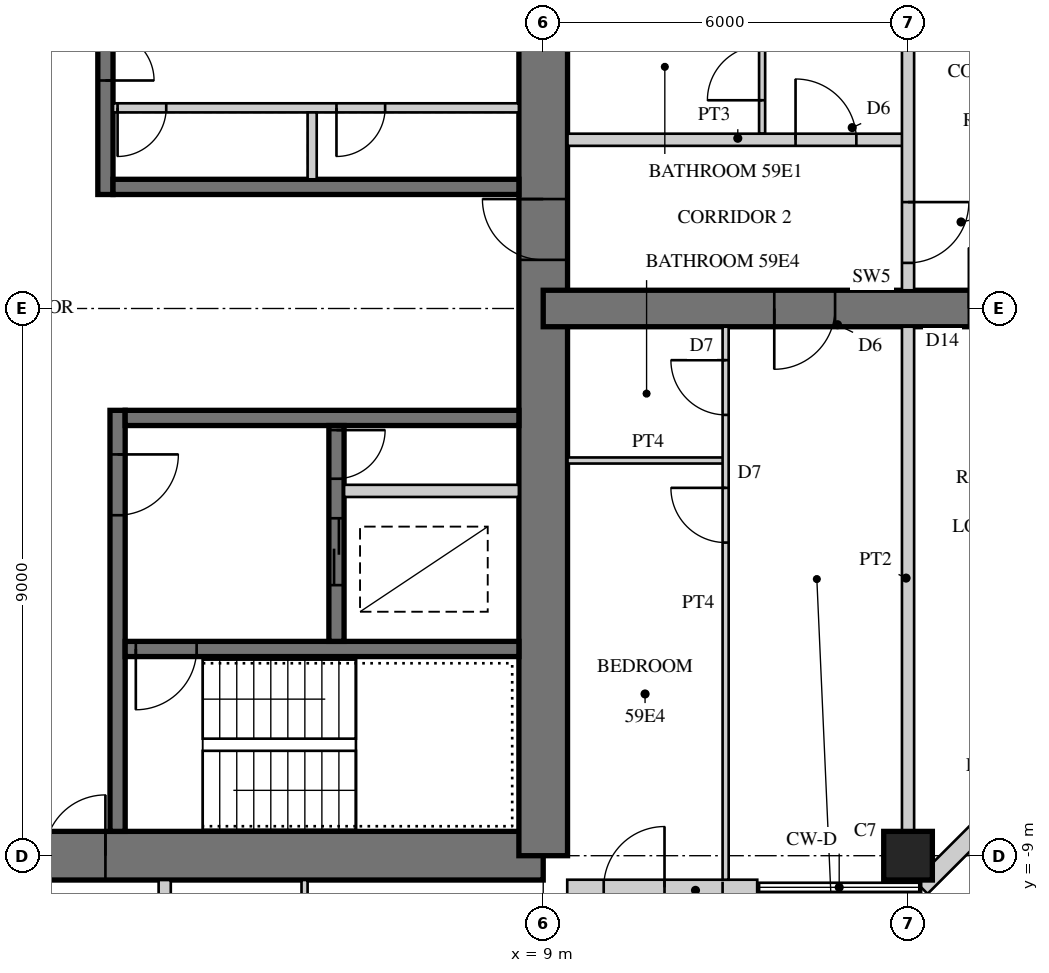
"""IFC4 building model, lengths in metres.
Left out: names, types, materials, properties, quantities, classifications, styles, units other than length and angle.
Written with IfcOpenShell. Run it as: python <this file> out.ifc"""

import sys

from ifc_helpers import new_model, si_unit, direction, frame, frame_2d, origin, origin_2d, place, context, subcontext, project, spatial, rectangle, hollow_rectangle, extrude, element, fill, save


model = new_model("IFC4")
c1 = context("Model", 3, precision=1e-05, world=origin(), true_north=direction((0.0, 1.0)))
c2 = subcontext(c1, "Body", "Model", "MODEL_VIEW")
j1 = project(units=[si_unit("LENGTHUNIT", "METRE"), si_unit("PLANEANGLEUNIT", "RADIAN")], contexts=[c1])
p1 = place(None, origin())
s1 = spatial("IfcSite", under=j1, at=p1, CompositionType="ELEMENT")
p2 = place(p1, origin())
s2 = spatial("IfcBuilding", under=s1, at=p2, CompositionType="ELEMENT")
p3 = place(p2, frame((0.0, 0.0, 232.3)))
s3 = spatial("IfcBuildingStorey", under=s2, at=p3, CompositionType="ELEMENT", Elevation=232.3)
p4 = place(p3, frame((-9.0, -9.0, 0.0), z_axis=(0.0, 0.0, 1.0), x_axis=(1.0, 0.0, 0.0)))
e1 = element("IfcWall", 1, at=p4, inside=s3, PredefinedType="SHEAR", context=c2, shape_type="SweptSolid", body=[
    extrude(rectangle(XDim=18.0, YDim=0.8, at=frame_2d((9.0, 0.0))), origin(), (0.0, 0.0, 1.0), 3.4),
])
p5 = place(p4, frame((9.8, 0.0, 0.0)))
e2 = element("IfcOpeningElement", 2, at=p5, cuts=e1, PredefinedType="OPENING", context=c2, shape_type="SweptSolid", body=[
    extrude(rectangle(XDim=1.0, YDim=2.4, at=frame_2d((0.5, 1.2))), frame((0.0, 0.41, 0.0), z_axis=(0.0, -1.0, 0.0), x_axis=(1.0, 0.0, 0.0)), (0.0, 0.0, 1.0), 0.82),
])
p6 = place(p3, frame((9.0, -9.0, 0.0), z_axis=(0.0, 0.0, 1.0), x_axis=(0.0, 1.0, 0.0)))
e3 = element("IfcWall", 3, at=p6, inside=s3, PredefinedType="SHEAR", context=c2, shape_type="SweptSolid", body=[
    extrude(rectangle(XDim=18.0, YDim=0.8, at=frame_2d((9.0, 0.0))), origin(), (0.0, 0.0, 1.0), 3.4),
])
p7 = place(p6, frame((9.8, 0.0, 0.0)))
e4 = element("IfcOpeningElement", 4, at=p7, cuts=e3, PredefinedType="OPENING", context=c2, shape_type="SweptSolid", body=[
    extrude(rectangle(XDim=1.0, YDim=2.4, at=frame_2d((0.5, 1.2))), frame((0.0, 0.41, 0.0), z_axis=(0.0, -1.0, 0.0), x_axis=(1.0, 0.0, 0.0)), (0.0, 0.0, 1.0), 0.82),
])
p8 = place(p3, frame((1.8, 1.875, 0.0), z_axis=(0.0, 0.0, 1.0), x_axis=(0.0, 1.0, 0.0)))
e5 = element("IfcWall", 5, at=p8, inside=s3, PredefinedType="SHEAR", context=c2, shape_type="SweptSolid", body=[
    extrude(rectangle(XDim=6.725, YDim=0.25, at=frame_2d((3.363, 0.0))), origin(), (0.0, 0.0, 1.0), 3.4),
])
p9 = place(p8, frame((1.875, 0.0, 0.0)))
e6 = element("IfcOpeningElement", 6, at=p9, cuts=e5, PredefinedType="OPENING", context=c2, shape_type="SweptSolid", body=[
    extrude(rectangle(XDim=1.6, YDim=2.4, at=frame_2d((0.8, 1.2))), frame((0.0, 0.135, 0.0), z_axis=(0.0, -1.0, 0.0), x_axis=(1.0, 0.0, 0.0)), (0.0, 0.0, 1.0), 0.27),
])
p10 = place(p3, frame((1.925, 2.0, 0.0), z_axis=(0.0, 0.0, 1.0), x_axis=(1.0, 0.0, 0.0)))
e7 = element("IfcWall", 7, at=p10, inside=s3, PredefinedType="SHEAR", context=c2, shape_type="SweptSolid", body=[
    extrude(rectangle(XDim=6.675, YDim=0.25, at=frame_2d((3.337, 0.0))), origin(), (0.0, 0.0, 1.0), 3.4),
])
p11 = place(p3, frame((1.925, 3.3, 0.0), z_axis=(0.0, 0.0, 1.0), x_axis=(1.0, 0.0, 0.0)))
e8 = element("IfcWall", 8, at=p11, inside=s3, PredefinedType="PARTITIONING", context=c2, shape_type="SweptSolid", body=[
    extrude(rectangle(XDim=6.675, YDim=0.15, at=frame_2d((3.337, 0.0))), origin(), (0.0, 0.0, 1.0), 3.4),
])
p12 = place(p11, frame((0.075, 0.0, 0.0)))
e9 = element("IfcOpeningElement", 9, at=p12, cuts=e8, PredefinedType="OPENING", context=c2, shape_type="SweptSolid", body=[
    extrude(rectangle(XDim=0.8, YDim=2.1, at=frame_2d((0.4, 1.05))), frame((0.0, 0.085, 0.0), z_axis=(0.0, -1.0, 0.0), x_axis=(1.0, 0.0, 0.0)), (0.0, 0.0, 1.0), 0.17),
])
p13 = place(p11, frame((3.675, 0.0, 0.0)))
e10 = element("IfcOpeningElement", 10, at=p13, cuts=e8, PredefinedType="OPENING", context=c2, shape_type="SweptSolid", body=[
    extrude(rectangle(XDim=0.8, YDim=2.1, at=frame_2d((0.4, 1.05))), frame((0.0, 0.085, 0.0), z_axis=(0.0, -1.0, 0.0), x_axis=(1.0, 0.0, 0.0)), (0.0, 0.0, 1.0), 0.17),
])
p14 = place(p3, frame((5.2, 2.125, 0.0), z_axis=(0.0, 0.0, 1.0), x_axis=(0.0, 1.0, 0.0)))
e11 = element("IfcWall", 11, at=p14, inside=s3, PredefinedType="PARTITIONING", context=c2, shape_type="SweptSolid", body=[
    extrude(rectangle(XDim=1.1, YDim=0.15, at=frame_2d((0.55, 0.0))), origin(), (0.0, 0.0, 1.0), 3.4),
])
p15 = place(p3, frame((2.0, -1.675, 0.0), z_axis=(0.0, 0.0, 1.0), x_axis=(0.0, -1.0, 0.0)))
e12 = element("IfcWall", 12, at=p15, inside=s3, PredefinedType="SHEAR", context=c2, shape_type="SweptSolid", body=[
    extrude(rectangle(XDim=6.925, YDim=0.25, at=frame_2d((3.462, 0.0))), origin(), (0.0, 0.0, 1.0), 3.4),
])
p16 = place(p15, frame((0.725, 0.0, 0.0)))
e13 = element("IfcOpeningElement", 13, at=p16, cuts=e12, PredefinedType="OPENING", context=c2, shape_type="SweptSolid", body=[
    extrude(rectangle(XDim=1.0, YDim=2.1, at=frame_2d((0.5, 1.05))), frame((0.0, 0.135, 0.0), z_axis=(0.0, -1.0, 0.0), x_axis=(1.0, 0.0, 0.0)), (0.0, 0.0, 1.0), 0.27),
])
p17 = place(p3, frame((2.125, -1.8, 0.0), z_axis=(0.0, 0.0, 1.0), x_axis=(1.0, 0.0, 0.0)))
e14 = element("IfcWall", 14, at=p17, inside=s3, PredefinedType="SHEAR", context=c2, shape_type="SweptSolid", body=[
    extrude(rectangle(XDim=6.475, YDim=0.25, at=frame_2d((3.238, 0.0))), origin(), (0.0, 0.0, 1.0), 3.4),
])
p18 = place(p3, frame((2.125, -5.6, 0.0), z_axis=(0.0, 0.0, 1.0), x_axis=(1.0, 0.0, 0.0)))
e15 = element("IfcWall", 15, at=p18, inside=s3, PredefinedType="SHEAR", context=c2, shape_type="SweptSolid", body=[
    extrude(rectangle(XDim=6.475, YDim=0.25, at=frame_2d((3.238, 0.0))), origin(), (0.0, 0.0, 1.0), 3.4),
])
p19 = place(p18, frame((0.175, 0.0, 0.0)))
e16 = element("IfcOpeningElement", 16, at=p19, cuts=e15, PredefinedType="OPENING", context=c2, shape_type="SweptSolid", body=[
    extrude(rectangle(XDim=1.0, YDim=2.1, at=frame_2d((0.5, 1.05))), frame((0.0, 0.135, 0.0), z_axis=(0.0, -1.0, 0.0), x_axis=(1.0, 0.0, 0.0)), (0.0, 0.0, 1.0), 0.27),
])
p20 = place(p3, frame((5.6, -1.925, 0.0), z_axis=(0.0, 0.0, 1.0), x_axis=(0.0, -1.0, 0.0)))
e17 = element("IfcWall", 17, at=p20, inside=s3, PredefinedType="SHEAR", context=c2, shape_type="SweptSolid", body=[
    extrude(rectangle(XDim=3.55, YDim=0.25, at=frame_2d((1.775, 0.0))), origin(), (0.0, 0.0, 1.0), 3.4),
])
p21 = place(p20, frame((1.525, 0.0, 0.0)))
e18 = element("IfcOpeningElement", 18, at=p21, cuts=e17, PredefinedType="OPENING", context=c2, shape_type="SweptSolid", body=[
    extrude(rectangle(XDim=1.1, YDim=2.2, at=frame_2d((0.55, 1.1))), frame((0.0, 0.135, 0.0), z_axis=(0.0, -1.0, 0.0), x_axis=(1.0, 0.0, 0.0)), (0.0, 0.0, 1.0), 0.27),
])
p22 = place(p20, frame((0.075, 0.0, 0.0)))
e19 = element("IfcOpeningElement", 19, at=p22, cuts=e17, PredefinedType="OPENING", context=c2, shape_type="SweptSolid", body=[
    extrude(rectangle(XDim=0.8, YDim=2.1, at=frame_2d((0.4, 1.05))), frame((0.0, 0.135, 0.0), z_axis=(0.0, -1.0, 0.0), x_axis=(1.0, 0.0, 0.0)), (0.0, 0.0, 1.0), 0.27),
])
p23 = place(p3, frame((5.725, -3.0, 0.0), z_axis=(0.0, 0.0, 1.0), x_axis=(1.0, 0.0, 0.0)))
e20 = element("IfcWall", 20, at=p23, inside=s3, PredefinedType="PARTITIONING", context=c2, shape_type="SweptSolid", body=[
    extrude(rectangle(XDim=2.875, YDim=0.2, at=frame_2d((1.438, 0.0))), origin(), (0.0, 0.0, 1.0), 3.4),
])
p24 = place(p3, frame((9.0, 0.0, 0.0), z_axis=(0.0, 0.0, 1.0), x_axis=(1.0, 0.0, 0.0)))
e21 = element("IfcWall", 21, at=p24, inside=s3, PredefinedType="SHEAR", context=c2, shape_type="SweptSolid", body=[
    extrude(rectangle(XDim=9.0, YDim=0.6, at=frame_2d((4.5, 0.0))), origin(), (0.0, 0.0, 1.0), 3.4),
])
p25 = place(p24, frame((3.8, 0.0, 0.0)))
e22 = element("IfcOpeningElement", 22, at=p25, cuts=e21, PredefinedType="OPENING", context=c2, shape_type="SweptSolid", body=[
    extrude(rectangle(XDim=1.0, YDim=2.15, at=frame_2d((0.5, 1.075))), frame((0.0, 0.31, 0.0), z_axis=(0.0, -1.0, 0.0), x_axis=(1.0, 0.0, 0.0)), (0.0, 0.0, 1.0), 0.62),
])
p26 = place(p24, frame((7.0, 0.0, 0.0)))
e23 = element("IfcOpeningElement", 23, at=p26, cuts=e21, PredefinedType="OPENING", context=c2, shape_type="SweptSolid", body=[
    extrude(rectangle(XDim=1.0, YDim=2.2, at=frame_2d((0.5, 1.1))), frame((0.0, 0.31, 0.0), z_axis=(0.0, -1.0, 0.0), x_axis=(1.0, 0.0, 0.0)), (0.0, 0.0, 1.0), 0.62),
])
p27 = place(p3, frame((15.0, -9.0, 0.0), z_axis=(0.0, 0.0, 1.0), x_axis=(1.0, 0.0, 0.0)))
e24 = element("IfcColumn", 24, at=p27, inside=s3, PredefinedType="COLUMN", context=c2, shape_type="SweptSolid", body=[
    extrude(rectangle(XDim=0.8, YDim=0.8, at=origin_2d()), origin(), (0.0, 0.0, 1.0), 3.4),
])
p28 = place(p3, frame((9.395, -9.52, 0.0), z_axis=(0.0, 0.0, 1.0), x_axis=(1.0, 0.0, 0.0)))
e25 = element("IfcWall", 25, at=p28, inside=s3, PredefinedType="SOLIDWALL", context=c2, shape_type="SweptSolid", body=[
    extrude(rectangle(XDim=3.125, YDim=0.25, at=frame_2d((1.562, 0.0))), origin(), (0.0, 0.0, 1.0), 3.22),
])
p29 = place(p28, frame((0.6, 0.0, 0.0)))
e26 = element("IfcOpeningElement", 26, at=p29, cuts=e25, PredefinedType="OPENING", context=c2, shape_type="SweptSolid", body=[
    extrude(rectangle(XDim=1.0, YDim=2.2, at=frame_2d((0.5, 1.1))), frame((0.0, 0.135, 0.0), z_axis=(0.0, -1.0, 0.0), x_axis=(1.0, 0.0, 0.0)), (0.0, 0.0, 1.0), 0.27),
])
p30 = place(p3, frame((15.215, -9.52, 0.0), z_axis=(0.0, 0.0, 1.0), x_axis=(0.707106781187, 0.707106781187, 0.0)))
e27 = element("IfcWall", 27, at=p30, inside=s3, PredefinedType="SOLIDWALL", context=c2, shape_type="SweptSolid", body=[
    extrude(rectangle(XDim=4.674, YDim=0.3, at=frame_2d((2.337, 0.0))), origin(), (0.0, 0.0, 1.0), 3.22),
])
p31 = place(p30, frame((1.887, 0.0, 0.3)))
e28 = element("IfcOpeningElement", 28, at=p31, cuts=e27, PredefinedType="OPENING", context=c2, shape_type="SweptSolid", body=[
    extrude(rectangle(XDim=0.9, YDim=2.4, at=frame_2d((0.45, 1.2))), frame((0.0, 0.16, 0.0), z_axis=(0.0, -1.0, 0.0), x_axis=(1.0, 0.0, 0.0)), (0.0, 0.0, 1.0), 0.32),
])
p32 = place(p3, frame((12.6, 2.875, 0.0), z_axis=(0.0, 0.0, 1.0), x_axis=(0.0, 1.0, 0.0)))
e29 = element("IfcWall", 29, at=p32, inside=s3, PredefinedType="PARTITIONING", context=c2, shape_type="SweptSolid", body=[
    extrude(rectangle(XDim=6.605, YDim=0.1, at=frame_2d((3.302, 0.0))), origin(), (0.0, 0.0, 1.0), 3.22),
])
p33 = place(p32, frame((0.55, 0.0, 0.0)))
e30 = element("IfcOpeningElement", 30, at=p33, cuts=e29, PredefinedType="OPENING", context=c2, shape_type="SweptSolid", body=[
    extrude(rectangle(XDim=0.9, YDim=2.1, at=frame_2d((0.45, 1.05))), frame((0.0, 0.06, 0.0), z_axis=(0.0, -1.0, 0.0), x_axis=(1.0, 0.0, 0.0)), (0.0, 0.0, 1.0), 0.12),
])
p34 = place(p32, frame((2.65, 0.0, 0.0)))
e31 = element("IfcOpeningElement", 31, at=p34, cuts=e29, PredefinedType="OPENING", context=c2, shape_type="SweptSolid", body=[
    extrude(rectangle(XDim=0.9, YDim=2.1, at=frame_2d((0.45, 1.05))), frame((0.0, 0.06, 0.0), z_axis=(0.0, -1.0, 0.0), x_axis=(1.0, 0.0, 0.0)), (0.0, 0.0, 1.0), 0.12),
])
p35 = place(p3, frame((9.4, -2.5, 0.0), z_axis=(0.0, 0.0, 1.0), x_axis=(1.0, 0.0, 0.0)))
e32 = element("IfcWall", 32, at=p35, inside=s3, PredefinedType="PARTITIONING", context=c2, shape_type="SweptSolid", body=[
    extrude(rectangle(XDim=2.65, YDim=0.1, at=frame_2d((1.325, 0.0))), origin(), (0.0, 0.0, 1.0), 3.22),
])
p36 = place(p3, frame((12.0, -9.395, 0.0), z_axis=(0.0, 0.0, 1.0), x_axis=(0.0, 1.0, 0.0)))
e33 = element("IfcWall", 33, at=p36, inside=s3, PredefinedType="PARTITIONING", context=c2, shape_type="SweptSolid", body=[
    extrude(rectangle(XDim=9.095, YDim=0.1, at=frame_2d((4.547, 0.0))), origin(), (0.0, 0.0, 1.0), 3.22),
])
p37 = place(p36, frame((5.545, 0.0, 0.0)))
e34 = element("IfcOpeningElement", 34, at=p37, cuts=e33, PredefinedType="OPENING", context=c2, shape_type="SweptSolid", body=[
    extrude(rectangle(XDim=0.9, YDim=2.1, at=frame_2d((0.45, 1.05))), frame((0.0, 0.06, 0.0), z_axis=(0.0, -1.0, 0.0), x_axis=(1.0, 0.0, 0.0)), (0.0, 0.0, 1.0), 0.12),
])
p38 = place(p36, frame((7.645, 0.0, 0.0)))
e35 = element("IfcOpeningElement", 35, at=p38, cuts=e33, PredefinedType="OPENING", context=c2, shape_type="SweptSolid", body=[
    extrude(rectangle(XDim=0.9, YDim=2.1, at=frame_2d((0.45, 1.05))), frame((0.0, 0.06, 0.0), z_axis=(0.0, -1.0, 0.0), x_axis=(1.0, 0.0, 0.0)), (0.0, 0.0, 1.0), 0.12),
])
p39 = place(p3, frame((9.4, 2.775, 0.0), z_axis=(0.0, 0.0, 1.0), x_axis=(1.0, 0.0, 0.0)))
e36 = element("IfcWall", 36, at=p39, inside=s3, PredefinedType="SOLIDWALL", context=c2, shape_type="SweptSolid", body=[
    extrude(rectangle(XDim=5.6, YDim=0.2, at=frame_2d((2.8, 0.0))), origin(), (0.0, 0.0, 1.0), 3.22),
])
p40 = place(p39, frame((3.75, 0.0, 0.0)))
e37 = element("IfcOpeningElement", 37, at=p40, cuts=e36, PredefinedType="OPENING", context=c2, shape_type="SweptSolid", body=[
    extrude(rectangle(XDim=1.0, YDim=2.15, at=frame_2d((0.5, 1.075))), frame((0.0, 0.11, 0.0), z_axis=(0.0, -1.0, 0.0), x_axis=(1.0, 0.0, 0.0)), (0.0, 0.0, 1.0), 0.22),
])
p41 = place(p3, frame((15.0, -8.6, 0.0), z_axis=(0.0, 0.0, 1.0), x_axis=(0.0, 1.0, 0.0)))
e38 = element("IfcWall", 38, at=p41, inside=s3, PredefinedType="SOLIDWALL", context=c2, shape_type="SweptSolid", body=[
    extrude(rectangle(XDim=8.3, YDim=0.2, at=frame_2d((4.15, 0.0))), origin(), (0.0, 0.0, 1.0), 2.52),
])
p42 = place(p3, frame((15.0, 0.3, 0.0), z_axis=(0.0, 0.0, 1.0), x_axis=(0.0, 1.0, 0.0)))
e39 = element("IfcWall", 39, at=p42, inside=s3, PredefinedType="SOLIDWALL", context=c2, shape_type="SweptSolid", body=[
    extrude(rectangle(XDim=8.3, YDim=0.2, at=frame_2d((4.15, 0.0))), origin(), (0.0, 0.0, 1.0), 2.52),
])
p43 = place(p42, frame((0.45, 0.0, 0.0)))
e40 = element("IfcOpeningElement", 40, at=p43, cuts=e39, PredefinedType="OPENING", context=c2, shape_type="SweptSolid", body=[
    extrude(rectangle(XDim=1.0, YDim=2.2, at=frame_2d((0.5, 1.1))), frame((0.0, 0.11, 0.0), z_axis=(0.0, -1.0, 0.0), x_axis=(1.0, 0.0, 0.0)), (0.0, 0.0, 1.0), 0.22),
])
p44 = place(p3, frame((5.075, -9.4, 0.0), z_axis=(0.0, 0.0, 1.0), x_axis=(0.0, -1.0, 0.0)))
e41 = element("IfcWall", 41, at=p44, inside=s3, PredefinedType="PARTITIONING", context=c2, shape_type="SweptSolid", body=[
    extrude(rectangle(XDim=3.25, YDim=0.1, at=frame_2d((1.625, 0.0))), origin(), (0.0, 0.0, 1.0), 3.22),
])
p45 = place(p3, frame((2.775, -9.4, 0.0), z_axis=(0.0, 0.0, 1.0), x_axis=(0.0, -1.0, 0.0)))
e42 = element("IfcWall", 42, at=p45, inside=s3, PredefinedType="SOLIDWALL", context=c2, shape_type="SweptSolid", body=[
    extrude(rectangle(XDim=5.6, YDim=0.2, at=frame_2d((2.8, 0.0))), origin(), (0.0, 0.0, 1.0), 3.22),
])
p46 = place(p45, frame((3.75, 0.0, 0.0)))
e43 = element("IfcOpeningElement", 43, at=p46, cuts=e42, PredefinedType="OPENING", context=c2, shape_type="SweptSolid", body=[
    extrude(rectangle(XDim=1.0, YDim=2.15, at=frame_2d((0.5, 1.075))), frame((0.0, 0.11, 0.0), z_axis=(0.0, -1.0, 0.0), x_axis=(1.0, 0.0, 0.0)), (0.0, 0.0, 1.0), 0.22),
])
p47 = place(p29, origin())
e44 = element("IfcDoor", 44, at=p47, inside=s3, OperationType="SINGLE_SWING_RIGHT", PredefinedType="DOOR", context=c2, shape_type="SweptSolid", body=[
    extrude(hollow_rectangle(XDim=1.0, YDim=2.2, WallThickness=0.06, at=frame_2d((0.5, 1.1))), frame((0.0, 0.025, 0.0), z_axis=(0.0, -1.0, 0.0), x_axis=(1.0, 0.0, 0.0)), (0.0, 0.0, 1.0), 0.05),
    extrude(rectangle(XDim=0.879, YDim=2.079, at=frame_2d((0.5, 1.1))), frame((0.0, 0.025, 0.0), z_axis=(0.0, -1.0, 0.0), x_axis=(1.0, 0.0, 0.0)), (0.0, 0.0, 1.0), 0.05),
])
fill(e26, e44)
p48 = place(p33, origin())
e45 = element("IfcDoor", 45, at=p48, inside=s3, OperationType="SINGLE_SWING_LEFT", PredefinedType="DOOR", context=c2, shape_type="SweptSolid", body=[
    extrude(rectangle(XDim=0.9, YDim=2.1, at=frame_2d((0.45, 1.05))), frame((0.0, 0.025, 0.0), z_axis=(0.0, -1.0, 0.0), x_axis=(1.0, 0.0, 0.0)), (0.0, 0.0, 1.0), 0.05),
])
fill(e30, e45)
p49 = place(p37, origin())
e46 = element("IfcDoor", 46, at=p49, inside=s3, OperationType="SINGLE_SWING_RIGHT", PredefinedType="DOOR", context=c2, shape_type="SweptSolid", body=[
    extrude(rectangle(XDim=0.9, YDim=2.1, at=frame_2d((0.45, 1.05))), frame((0.0, 0.025, 0.0), z_axis=(0.0, -1.0, 0.0), x_axis=(1.0, 0.0, 0.0)), (0.0, 0.0, 1.0), 0.05),
])
fill(e34, e46)
p50 = place(p38, origin())
e47 = element("IfcDoor", 47, at=p50, inside=s3, OperationType="SINGLE_SWING_RIGHT", PredefinedType="DOOR", context=c2, shape_type="SweptSolid", body=[
    extrude(rectangle(XDim=0.9, YDim=2.1, at=frame_2d((0.45, 1.05))), frame((0.0, 0.025, 0.0), z_axis=(0.0, -1.0, 0.0), x_axis=(1.0, 0.0, 0.0)), (0.0, 0.0, 1.0), 0.05),
])
fill(e35, e47)
p51 = place(p40, origin())
e48 = element("IfcDoor", 48, at=p51, inside=s3, OperationType="SINGLE_SWING_LEFT", PredefinedType="DOOR", context=c2, shape_type="SweptSolid", body=[
    extrude(rectangle(XDim=1.0, YDim=2.15, at=frame_2d((0.5, 1.075))), frame((0.0, 0.025, 0.0), z_axis=(0.0, -1.0, 0.0), x_axis=(1.0, 0.0, 0.0)), (0.0, 0.0, 1.0), 0.05),
])
fill(e37, e48)
p52 = place(p43, frame((1.0, 0.0, 0.0), z_axis=(0.0, 0.0, 1.0), x_axis=(-1.0, 0.0, 0.0)))
e49 = element("IfcDoor", 49, at=p52, inside=s3, OperationType="SINGLE_SWING_LEFT", PredefinedType="DOOR", context=c2, shape_type="SweptSolid", body=[
    extrude(rectangle(XDim=1.0, YDim=2.2, at=frame_2d((0.5, 1.1))), frame((0.0, 0.025, 0.0), z_axis=(0.0, -1.0, 0.0), x_axis=(1.0, 0.0, 0.0)), (0.0, 0.0, 1.0), 0.05),
])
fill(e40, e49)
p53 = place(p25, frame((1.0, 0.0, 0.0), z_axis=(0.0, 0.0, 1.0), x_axis=(-1.0, 0.0, 0.0)))
e50 = element("IfcDoor", 50, at=p53, inside=s3, OperationType="SINGLE_SWING_RIGHT", PredefinedType="DOOR", context=c2, shape_type="SweptSolid", body=[
    extrude(rectangle(XDim=1.0, YDim=2.15, at=frame_2d((0.5, 1.075))), frame((0.0, 0.025, 0.0), z_axis=(0.0, -1.0, 0.0), x_axis=(1.0, 0.0, 0.0)), (0.0, 0.0, 1.0), 0.05),
])
fill(e22, e50)
p54 = place(p5, origin())
e51 = element("IfcDoor", 51, at=p54, inside=s3, OperationType="SINGLE_SWING_RIGHT", PredefinedType="DOOR", context=c2, shape_type="SweptSolid", body=[
    extrude(rectangle(XDim=1.0, YDim=2.4, at=frame_2d((0.5, 1.2))), frame((0.0, 0.055, 0.0), z_axis=(0.0, -1.0, 0.0), x_axis=(1.0, 0.0, 0.0)), (0.0, 0.0, 1.0), 0.05),
])
fill(e2, e51)
p55 = place(p7, origin())
e52 = element("IfcDoor", 52, at=p55, inside=s3, OperationType="SINGLE_SWING_RIGHT", PredefinedType="DOOR", context=c2, shape_type="SweptSolid", body=[
    extrude(rectangle(XDim=1.0, YDim=2.4, at=frame_2d((0.5, 1.2))), frame((0.0, 0.055, 0.0), z_axis=(0.0, -1.0, 0.0), x_axis=(1.0, 0.0, 0.0)), (0.0, 0.0, 1.0), 0.05),
])
fill(e4, e52)
p56 = place(p9, frame((1.6, 0.0, 0.0), z_axis=(0.0, 0.0, 1.0), x_axis=(-1.0, 0.0, 0.0)))
e53 = element("IfcDoor", 53, at=p56, inside=s3, OperationType="DOUBLE_DOOR_SINGLE_SWING", PredefinedType="DOOR", context=c2, shape_type="SweptSolid", body=[
    extrude(rectangle(XDim=1.6, YDim=2.4, at=frame_2d((0.8, 1.2))), frame((0.0, 0.025, 0.0), z_axis=(0.0, -1.0, 0.0), x_axis=(1.0, 0.0, 0.0)), (0.0, 0.0, 1.0), 0.05),
])
fill(e6, e53)
p57 = place(p12, frame((0.8, 0.0, 0.0), z_axis=(0.0, 0.0, 1.0), x_axis=(-1.0, 0.0, 0.0)))
e54 = element("IfcDoor", 54, at=p57, inside=s3, OperationType="SINGLE_SWING_RIGHT", PredefinedType="DOOR", context=c2, shape_type="SweptSolid", body=[
    extrude(rectangle(XDim=0.8, YDim=2.1, at=frame_2d((0.4, 1.05))), frame((0.0, 0.025, 0.0), z_axis=(0.0, -1.0, 0.0), x_axis=(1.0, 0.0, 0.0)), (0.0, 0.0, 1.0), 0.05),
])
fill(e9, e54)
p58 = place(p13, frame((0.8, 0.0, 0.0), z_axis=(0.0, 0.0, 1.0), x_axis=(-1.0, 0.0, 0.0)))
e55 = element("IfcDoor", 55, at=p58, inside=s3, OperationType="SINGLE_SWING_RIGHT", PredefinedType="DOOR", context=c2, shape_type="SweptSolid", body=[
    extrude(rectangle(XDim=0.8, YDim=2.1, at=frame_2d((0.4, 1.05))), frame((0.0, 0.025, 0.0), z_axis=(0.0, -1.0, 0.0), x_axis=(1.0, 0.0, 0.0)), (0.0, 0.0, 1.0), 0.05),
])
fill(e10, e55)
p59 = place(p16, origin())
e56 = element("IfcDoor", 56, at=p59, inside=s3, OperationType="SINGLE_SWING_LEFT", PredefinedType="DOOR", context=c2, shape_type="SweptSolid", body=[
    extrude(rectangle(XDim=1.0, YDim=2.1, at=frame_2d((0.5, 1.05))), frame((0.0, 0.025, 0.0), z_axis=(0.0, -1.0, 0.0), x_axis=(1.0, 0.0, 0.0)), (0.0, 0.0, 1.0), 0.05),
])
fill(e13, e56)
p60 = place(p19, frame((1.0, 0.0, 0.0), z_axis=(0.0, 0.0, 1.0), x_axis=(-1.0, 0.0, 0.0)))
e57 = element("IfcDoor", 57, at=p60, inside=s3, OperationType="SINGLE_SWING_RIGHT", PredefinedType="DOOR", context=c2, shape_type="SweptSolid", body=[
    extrude(rectangle(XDim=1.0, YDim=2.1, at=frame_2d((0.5, 1.05))), frame((0.0, 0.025, 0.0), z_axis=(0.0, -1.0, 0.0), x_axis=(1.0, 0.0, 0.0)), (0.0, 0.0, 1.0), 0.05),
])
fill(e16, e57)
p61 = place(p21, origin())
e58 = element("IfcDoor", 58, at=p61, inside=s3, OperationType="DOUBLE_DOOR_SLIDING", PredefinedType="DOOR", context=c2, shape_type="SweptSolid", body=[
    extrude(rectangle(XDim=1.1, YDim=2.2, at=frame_2d((0.55, 1.1))), frame((0.0, 0.025, 0.0), z_axis=(0.0, -1.0, 0.0), x_axis=(1.0, 0.0, 0.0)), (0.0, 0.0, 1.0), 0.05),
])
fill(e18, e58)
p62 = place(p22, origin())
e59 = element("IfcDoor", 59, at=p62, inside=s3, OperationType="SINGLE_SWING_LEFT", PredefinedType="DOOR", context=c2, shape_type="SweptSolid", body=[
    extrude(rectangle(XDim=0.8, YDim=2.1, at=frame_2d((0.4, 1.05))), frame((0.0, 0.025, 0.0), z_axis=(0.0, -1.0, 0.0), x_axis=(1.0, 0.0, 0.0)), (0.0, 0.0, 1.0), 0.05),
])
fill(e19, e59)
save(model, sys.argv[1])
